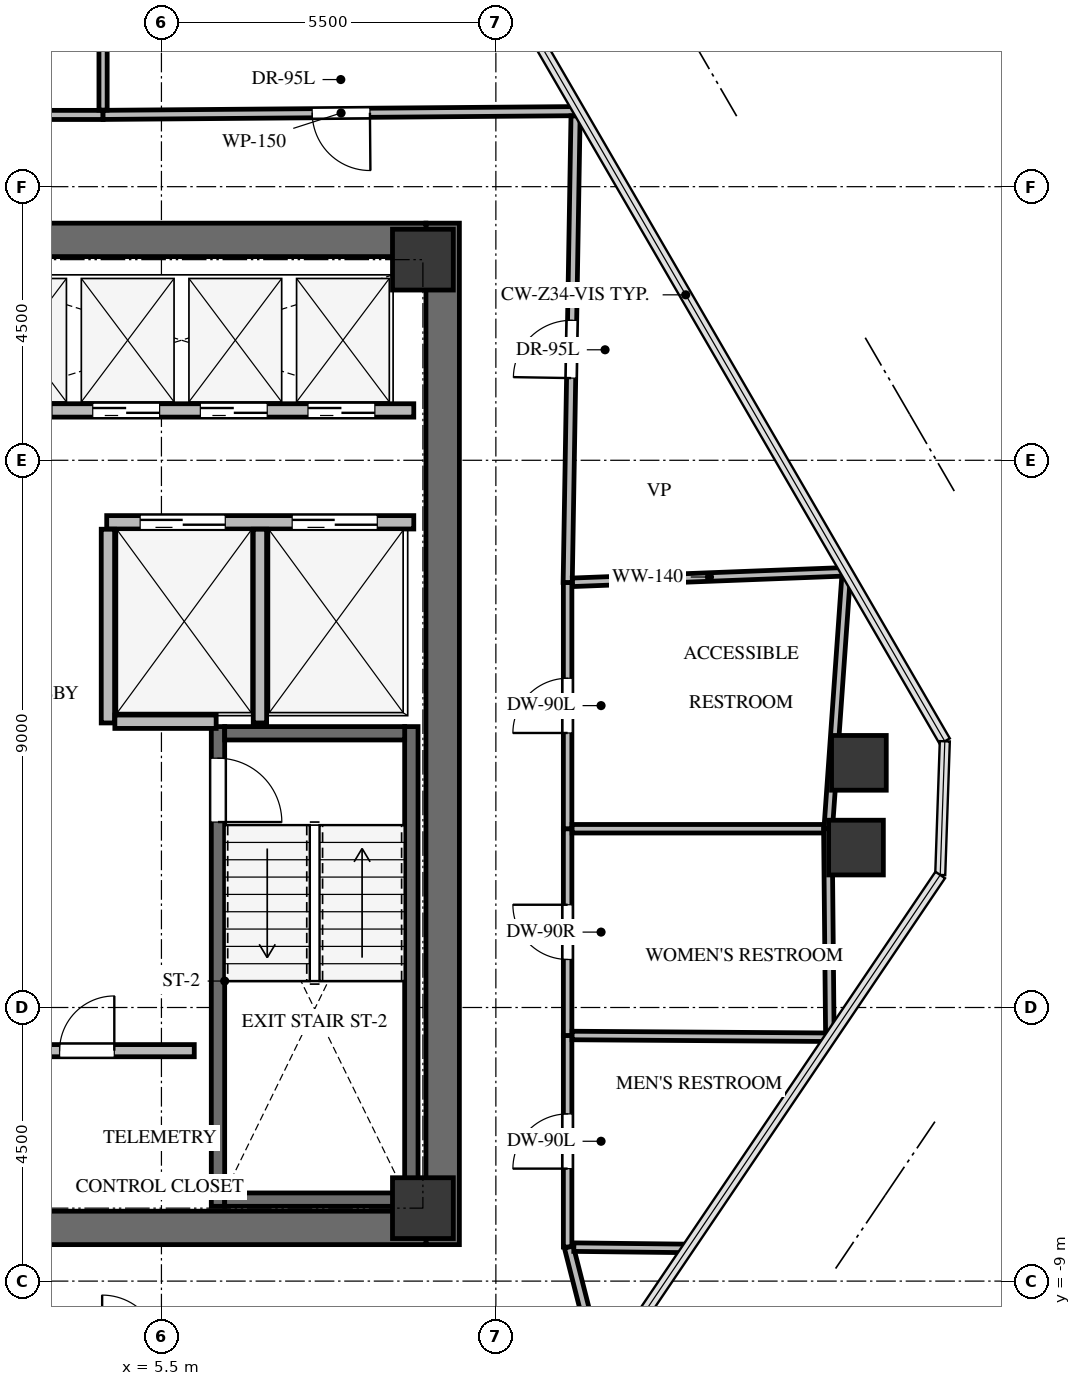
"""IFC4 building model, lengths in metres.
Left out: names, types, materials, properties, quantities, classifications, styles, units other than length and angle.
Written with IfcOpenShell. Run it as: python <this file> out.ifc"""

import sys

from ifc_helpers import new_model, si_unit, direction, frame, frame_2d, origin, origin_2d, place, context, subcontext, project, spatial, rectangle, extrude, source, transform, mapped, element, fill, save


model = new_model("IFC4")
c1 = context("Model", 3, precision=1e-05, world=origin(), true_north=direction((0.0, 1.0)))
c2 = subcontext(c1, "Body", "Model", "MODEL_VIEW")
j1 = project(units=[si_unit("LENGTHUNIT", "METRE"), si_unit("PLANEANGLEUNIT", "RADIAN")], contexts=[c1])
p1 = place(None, origin())
s1 = spatial("IfcSite", under=j1, at=p1, CompositionType="ELEMENT")
p2 = place(p1, origin())
s2 = spatial("IfcBuilding", under=s1, at=p2, CompositionType="ELEMENT")
p3 = place(p2, frame((0.0, 0.0, 231.5)))
s3 = spatial("IfcBuildingStorey", under=s2, at=p3, CompositionType="ELEMENT", Elevation=231.5)
p4 = place(p3, frame((10.125, -8.4, 0.0), z_axis=(0.0, 0.0, 1.0), x_axis=(0.0, 1.0, 0.0)))
e1 = element("IfcWall", 1, at=p4, inside=s3, PredefinedType="SHEAR", context=c2, shape_type="SweptSolid", body=[
    extrude(rectangle(XDim=16.8, YDim=0.55, at=frame_2d((8.4, 0.0))), origin(), (0.0, 0.0, 1.0), 3.3),
])
p5 = place(p3, frame((2.1, -8.125, 0.0), z_axis=(0.0, 0.0, 1.0), x_axis=(1.0, 0.0, 0.0)))
e2 = element("IfcWall", 2, at=p5, inside=s3, PredefinedType="SHEAR", context=c2, shape_type="SweptSolid", body=[
    extrude(rectangle(XDim=7.75, YDim=0.55, at=frame_2d((3.875, 0.0))), origin(), (0.0, 0.0, 1.0), 3.3),
])
p6 = place(p3, frame((-9.85, 8.125, 0.0), z_axis=(0.0, 0.0, 1.0), x_axis=(1.0, 0.0, 0.0)))
e3 = element("IfcWall", 3, at=p6, inside=s3, PredefinedType="SHEAR", context=c2, shape_type="SweptSolid", body=[
    extrude(rectangle(XDim=19.7, YDim=0.55, at=frame_2d((9.85, 0.0))), origin(), (0.0, 0.0, 1.0), 3.3),
])
p7 = place(p3, frame((9.61, -7.77, -0.24), z_axis=(0.0, 0.0, 1.0), x_axis=(0.0, 1.0, 0.0)))
e4 = element("IfcWall", 4, at=p7, inside=s3, PredefinedType="SHEAR", context=c2, shape_type="SweptSolid", body=[
    extrude(rectangle(XDim=7.89, YDim=0.22, at=frame_2d((3.945, 0.0))), origin(), (0.0, 0.0, 1.0), 3.3),
])
p8 = place(p3, frame((6.43, 0.12, -0.24), z_axis=(0.0, 0.0, 1.0), x_axis=(0.0, -1.0, 0.0)))
e5 = element("IfcWall", 5, at=p8, inside=s3, PredefinedType="SHEAR", context=c2, shape_type="SweptSolid", body=[
    extrude(rectangle(XDim=7.89, YDim=0.22, at=frame_2d((3.945, 0.0))), origin(), (0.0, 0.0, 1.0), 3.3),
])
p9 = place(p8, frame((0.52, 0.0, 0.0)))
e6 = element("IfcOpeningElement", 6, at=p9, cuts=e5, PredefinedType="OPENING", context=c2, shape_type="SweptSolid", body=[
    extrude(rectangle(XDim=1.05, YDim=2.15, at=frame_2d((0.525, 1.075))), frame((0.0, 0.12, 0.0), z_axis=(0.0, -1.0, 0.0), x_axis=(1.0, 0.0, 0.0)), (0.0, 0.0, 1.0), 0.24),
])
for number, where, z_axis, x_axis in (
    (7, (6.54, -7.66, -0.24), (0.0, 0.0, 1.0), (1.0, 0.0, 0.0)),
    (8, (9.5, 0.01, -0.24), (0.0, 0.0, 1.0), (-1.0, 0.0, 0.0)),
):
    element("IfcWall", number, at=place(p3, frame(where, z_axis=z_axis, x_axis=x_axis)), inside=s3, PredefinedType="SHEAR", context=c2, shape_type="SweptSolid", body=[
        extrude(rectangle(XDim=2.96, YDim=0.22, at=frame_2d((1.48, 0.0))), origin(), (0.0, 0.0, 1.0), 3.3),
    ])
m1 = source(origin(), c2, "Body", "SweptSolid", [
    extrude(rectangle(XDim=1.0, YDim=1.0, at=origin_2d()), origin(), (0.0, 0.0, 1.0), 3.3),
])
for number, where, z_axis, x_axis in (
    (9, (9.8, -7.8, -0.24), (0.0, 0.0, 1.0), (1.0, 0.0, 0.0)),
    (10, (9.8, 7.8, -0.24), (0.0, 0.0, 1.0), (1.0, 0.0, 0.0)),
):
    element("IfcColumn", number, at=place(p3, frame(where, z_axis=z_axis, x_axis=x_axis)), inside=s3, PredefinedType="COLUMN", context=c2, shape_type="MappedRepresentation", body=[
        mapped(m1, transform((0.0, 0.0, 0.0), x_axis=(1.0, 0.0, 0.0), y_axis=(0.0, 1.0, 0.0), z_axis=(0.0, 0.0, 1.0), scale=1.0)),
    ])
m2 = source(origin(), c2, "Body", "SweptSolid", [
    extrude(rectangle(XDim=0.9, YDim=0.9, at=origin_2d()), origin(), (0.0, 0.0, 1.0), 3.3),
])
for number, where, z_axis, x_axis in (
    (11, (16.97, -0.476, -0.24), (0.0, 0.0, 1.0), (1.0, 0.0, 0.0)),
    (12, (16.922, -1.87, -0.24), (0.0, 0.0, 1.0), (1.0, 0.0, 0.0)),
):
    element("IfcColumn", number, at=place(p3, frame(where, z_axis=z_axis, x_axis=x_axis)), inside=s3, PredefinedType="COLUMN", context=c2, shape_type="MappedRepresentation", body=[
        mapped(m2, transform((0.0, 0.0, 0.0), x_axis=(1.0, 0.0, 0.0), y_axis=(0.0, 1.0, 0.0), z_axis=(0.0, 0.0, 1.0), scale=1.0)),
    ])
p10 = place(p3, frame((4.6, 3.48, 0.0), z_axis=(0.0, 0.0, 1.0), x_axis=(1.0, 0.0, 0.0)))
e13 = element("IfcWall", 13, at=p10, inside=s3, PredefinedType="SOLIDWALL", context=c2, shape_type="SweptSolid", body=[
    extrude(rectangle(XDim=5.05, YDim=0.22, at=frame_2d((2.525, 0.0))), origin(), (0.0, 0.0, 1.0), 3.045),
])
p11 = place(p10, frame((0.55, 0.0, 0.0)))
e14 = element("IfcOpeningElement", 14, at=p11, cuts=e13, PredefinedType="OPENING", context=c2, shape_type="SweptSolid", body=[
    extrude(rectangle(XDim=1.4, YDim=2.15, at=frame_2d((0.7, 1.075))), frame((0.0, 0.12, 0.0), z_axis=(0.0, -1.0, 0.0), x_axis=(1.0, 0.0, 0.0)), (0.0, 0.0, 1.0), 0.24),
])
p12 = place(p10, frame((3.05, 0.0, 0.0)))
e15 = element("IfcOpeningElement", 15, at=p12, cuts=e13, PredefinedType="OPENING", context=c2, shape_type="SweptSolid", body=[
    extrude(rectangle(XDim=1.4, YDim=2.15, at=frame_2d((0.7, 1.075))), frame((0.0, 0.12, 0.0), z_axis=(0.0, -1.0, 0.0), x_axis=(1.0, 0.0, 0.0)), (0.0, 0.0, 1.0), 0.24),
])
for number, where, z_axis, x_axis in (
    (16, (4.62, 0.18, 0.0), (0.0, 0.0, 1.0), (0.0, 1.0, 0.0)),
    (17, (7.12, 0.18, 0.0), (0.0, 0.0, 1.0), (0.0, 1.0, 0.0)),
):
    element("IfcWall", number, at=place(p3, frame(where, z_axis=z_axis, x_axis=x_axis)), inside=s3, PredefinedType="SOLIDWALL", context=c2, shape_type="SweptSolid", body=[
        extrude(rectangle(XDim=3.186, YDim=0.22, at=frame_2d((1.593, 0.0))), origin(), (0.0, 0.0, 1.0), 3.045),
    ])
p13 = place(p3, frame((4.734, 0.2, 0.0), z_axis=(0.0, 0.0, 1.0), x_axis=(1.0, 0.0, 0.0)))
e18 = element("IfcWall", 18, at=p13, inside=s3, PredefinedType="SOLIDWALL", context=c2, shape_type="SweptSolid", body=[
    extrude(rectangle(XDim=1.666, YDim=0.22, at=frame_2d((0.833, 0.0))), origin(), (0.0, 0.0, 1.0), 3.045),
])
p14 = place(p3, frame((2.325, 5.32, 0.0), z_axis=(0.0, 0.0, 1.0), x_axis=(1.0, 0.0, 0.0)))
e19 = element("IfcWall", 19, at=p14, inside=s3, PredefinedType="SOLIDWALL", context=c2, shape_type="SweptSolid", body=[
    extrude(rectangle(XDim=7.325, YDim=0.22, at=frame_2d((3.663, 0.0))), origin(), (0.0, 0.0, 1.0), 3.045),
])
p15 = place(p14, frame((0.275, 0.0, 0.0)))
e20 = element("IfcOpeningElement", 20, at=p15, cuts=e19, PredefinedType="OPENING", context=c2, shape_type="SweptSolid", body=[
    extrude(rectangle(XDim=1.1, YDim=2.15, at=frame_2d((0.55, 1.075))), frame((0.0, 0.12, 0.0), z_axis=(0.0, -1.0, 0.0), x_axis=(1.0, 0.0, 0.0)), (0.0, 0.0, 1.0), 0.24),
])
p16 = place(p14, frame((2.045, 0.0, 0.0)))
e21 = element("IfcOpeningElement", 21, at=p16, cuts=e19, PredefinedType="OPENING", context=c2, shape_type="SweptSolid", body=[
    extrude(rectangle(XDim=1.1, YDim=2.15, at=frame_2d((0.55, 1.075))), frame((0.0, 0.12, 0.0), z_axis=(0.0, -1.0, 0.0), x_axis=(1.0, 0.0, 0.0)), (0.0, 0.0, 1.0), 0.24),
])
p17 = place(p14, frame((3.815, 0.0, 0.0)))
e22 = element("IfcOpeningElement", 22, at=p17, cuts=e19, PredefinedType="OPENING", context=c2, shape_type="SweptSolid", body=[
    extrude(rectangle(XDim=1.1, YDim=2.15, at=frame_2d((0.55, 1.075))), frame((0.0, 0.12, 0.0), z_axis=(0.0, -1.0, 0.0), x_axis=(1.0, 0.0, 0.0)), (0.0, 0.0, 1.0), 0.24),
])
p18 = place(p14, frame((5.585, 0.0, 0.0)))
e23 = element("IfcOpeningElement", 23, at=p18, cuts=e19, PredefinedType="OPENING", context=c2, shape_type="SweptSolid", body=[
    extrude(rectangle(XDim=1.1, YDim=2.15, at=frame_2d((0.55, 1.075))), frame((0.0, 0.12, 0.0), z_axis=(0.0, -1.0, 0.0), x_axis=(1.0, 0.0, 0.0)), (0.0, 0.0, 1.0), 0.24),
])
p19 = place(p3, frame((2.51, -5.21, 0.0), z_axis=(0.0, 0.0, 1.0), x_axis=(1.0, 0.0, 0.0)))
e24 = element("IfcWall", 24, at=p19, inside=s3, PredefinedType="SOLIDWALL", context=c2, shape_type="SweptSolid", body=[
    extrude(rectangle(XDim=3.53, YDim=0.2, at=frame_2d((1.765, 0.0))), origin(), (0.0, 0.0, 1.0), 3.045),
])
p20 = place(p19, frame((1.315, 0.0, 0.0)))
e25 = element("IfcOpeningElement", 25, at=p20, cuts=e24, PredefinedType="OPENING", context=c2, shape_type="SweptSolid", body=[
    extrude(rectangle(XDim=0.9, YDim=2.05, at=frame_2d((0.45, 1.025))), frame((0.0, 0.11, 0.0), z_axis=(0.0, -1.0, 0.0), x_axis=(1.0, 0.0, 0.0)), (0.0, 0.0, 1.0), 0.22),
])
p21 = place(p3, frame((12.18, -8.44, 0.0), z_axis=(0.0, 0.0, 1.0), x_axis=(0.0, 1.0, 0.0)))
e26 = element("IfcWall", 26, at=p21, inside=s3, PredefinedType="PARTITIONING", context=c2, shape_type="SweptSolid", body=[
    extrude(rectangle(XDim=3.48, YDim=0.14, at=frame_2d((1.74, 0.0))), origin(), (0.0, 0.0, 1.0), 2.399),
])
p22 = place(p21, frame((1.29, 0.0, 0.0)))
e27 = element("IfcOpeningElement", 27, at=p22, cuts=e26, PredefinedType="OPENING", context=c2, shape_type="SweptSolid", body=[
    extrude(rectangle(XDim=0.9, YDim=2.05, at=frame_2d((0.45, 1.025))), frame((0.0, 0.08, 0.0), z_axis=(0.0, -1.0, 0.0), x_axis=(1.0, 0.0, 0.0)), (0.0, 0.0, 1.0), 0.16),
])
p23 = place(p3, frame((12.18, -4.96, 0.0), z_axis=(0.0, 0.0, 1.0), x_axis=(0.0, 1.0, 0.0)))
e28 = element("IfcWall", 28, at=p23, inside=s3, PredefinedType="PARTITIONING", context=c2, shape_type="SweptSolid", body=[
    extrude(rectangle(XDim=3.4, YDim=0.14, at=frame_2d((1.7, 0.0))), origin(), (0.0, 0.0, 1.0), 3.045),
])
p24 = place(p23, frame((1.25, 0.0, 0.0)))
e29 = element("IfcOpeningElement", 29, at=p24, cuts=e28, PredefinedType="OPENING", context=c2, shape_type="SweptSolid", body=[
    extrude(rectangle(XDim=0.9, YDim=2.05, at=frame_2d((0.45, 1.025))), frame((0.0, 0.08, 0.0), z_axis=(0.0, -1.0, 0.0), x_axis=(1.0, 0.0, 0.0)), (0.0, 0.0, 1.0), 0.16),
])
p25 = place(p3, frame((12.18, -1.56, 0.0), z_axis=(0.0, 0.0, 1.0), x_axis=(0.0, 1.0, 0.0)))
e30 = element("IfcWall", 30, at=p25, inside=s3, PredefinedType="PARTITIONING", context=c2, shape_type="SweptSolid", body=[
    extrude(rectangle(XDim=4.05, YDim=0.14, at=frame_2d((2.025, 0.0))), origin(), (0.0, 0.0, 1.0), 2.301),
])
p26 = place(p25, frame((1.575, 0.0, 0.0)))
e31 = element("IfcOpeningElement", 31, at=p26, cuts=e30, PredefinedType="OPENING", context=c2, shape_type="SweptSolid", body=[
    extrude(rectangle(XDim=0.9, YDim=2.05, at=frame_2d((0.45, 1.025))), frame((0.0, 0.08, 0.0), z_axis=(0.0, -1.0, 0.0), x_axis=(1.0, 0.0, 0.0)), (0.0, 0.0, 1.0), 0.16),
])
p27 = place(p3, frame((4.54, 10.18, 0.0), z_axis=(0.0, 0.0, 1.0), x_axis=(-1.0, 0.0, 0.0)))
e32 = element("IfcWall", 32, at=p27, inside=s3, PredefinedType="PARTITIONING", context=c2, shape_type="SweptSolid", body=[
    extrude(rectangle(XDim=3.451, YDim=0.15, at=frame_2d((1.726, 0.0))), origin(), (0.0, 0.0, 1.0), 3.045),
])
p28 = place(p3, frame((12.368, 10.243, 0.0), z_axis=(0.0, 0.0, 1.0), x_axis=(-0.999968379606, -0.007952344825, 0.0)))
e33 = element("IfcWall", 33, at=p28, inside=s3, PredefinedType="PARTITIONING", context=c2, shape_type="SweptSolid", body=[
    extrude(rectangle(XDim=7.829, YDim=0.15, at=frame_2d((3.914, 0.0))), origin(), (0.0, 0.0, 1.0), 2.301),
])
p29 = place(p28, frame((3.439, 0.0, 0.0)))
e34 = element("IfcOpeningElement", 34, at=p29, cuts=e33, PredefinedType="OPENING", context=c2, shape_type="SweptSolid", body=[
    extrude(rectangle(XDim=0.95, YDim=2.1, at=frame_2d((0.475, 1.05))), frame((0.0, 0.085, 0.0), z_axis=(0.0, -1.0, 0.0), x_axis=(1.0, 0.0, 0.0)), (0.0, 0.0, 1.0), 0.17),
])
p30 = place(p3, frame((12.718, -10.477, 0.0), z_axis=(0.0, 0.0, 1.0), x_axis=(-0.246496791887, 0.96914360731, 0.0)))
e35 = element("IfcWall", 35, at=p30, inside=s3, PredefinedType="PARTITIONING", context=c2, shape_type="SweptSolid", body=[
    extrude(rectangle(XDim=2.102, YDim=0.15, at=frame_2d((1.051, 0.0))), origin(), (0.0, 0.0, 1.0), 2.399),
])
p31 = place(p3, frame((12.181, 2.49, 0.0), z_axis=(0.0, 0.0, 1.0), x_axis=(0.016828669653, 0.999858387912, 0.0)))
e36 = element("IfcWall", 36, at=p31, inside=s3, PredefinedType="PARTITIONING", context=c2, shape_type="SweptSolid", body=[
    extrude(rectangle(XDim=7.674, YDim=0.15, at=frame_2d((3.837, 0.0))), origin(), (0.0, 0.0, 1.0), 2.399),
])
p32 = place(p31, frame((3.362, 0.0, 0.0)))
e37 = element("IfcOpeningElement", 37, at=p32, cuts=e36, PredefinedType="OPENING", context=c2, shape_type="SweptSolid", body=[
    extrude(rectangle(XDim=0.95, YDim=2.1, at=frame_2d((0.475, 1.05))), frame((0.0, 0.085, 0.0), z_axis=(0.0, -1.0, 0.0), x_axis=(1.0, 0.0, 0.0)), (0.0, 0.0, 1.0), 0.17),
])
p33 = place(p3, frame((12.254, -4.96, 0.0), z_axis=(0.0, 0.0, 1.0), x_axis=(0.999976630429, -0.006836563198, 0.0)))
e38 = element("IfcWall", 38, at=p33, inside=s3, PredefinedType="PARTITIONING", context=c2, shape_type="SweptSolid", body=[
    extrude(rectangle(XDim=4.25, YDim=0.14, at=frame_2d((2.125, 0.0))), origin(), (0.0, 0.0, 1.0), 2.399),
])
p34 = place(p3, frame((14.156, -8.462, 0.0), z_axis=(0.0, 0.0, 1.0), x_axis=(-0.999935742613, 0.011336253532, 0.0)))
e39 = element("IfcWall", 39, at=p34, inside=s3, PredefinedType="PARTITIONING", context=c2, shape_type="SweptSolid", body=[
    extrude(rectangle(XDim=1.874, YDim=0.14, at=frame_2d((0.937, 0.0))), origin(), (0.0, 0.0, 1.0), 2.399),
])
p35 = place(p3, frame((12.254, -1.56, 0.0), z_axis=(0.0, 0.0, 1.0), x_axis=(1.0, 0.0, 0.0)))
e40 = element("IfcWall", 40, at=p35, inside=s3, PredefinedType="PARTITIONING", context=c2, shape_type="SweptSolid", body=[
    extrude(rectangle(XDim=4.206, YDim=0.14, at=frame_2d((2.103, 0.0))), origin(), (0.0, 0.0, 1.0), 2.301),
])
p36 = place(p3, frame((16.46, -1.56, 0.0), z_axis=(0.0, 0.0, 1.0), x_axis=(0.009604446748, -0.999953876238, 0.0)))
e41 = element("IfcWall", 41, at=p36, inside=s3, PredefinedType="PARTITIONING", context=c2, shape_type="SweptSolid", body=[
    extrude(rectangle(XDim=3.355, YDim=0.14, at=frame_2d((1.678, 0.0))), origin(), (0.0, 0.0, 1.0), 2.301),
])
p37 = place(p3, frame((12.26, 2.493, 0.0), z_axis=(0.0, 0.0, 1.0), x_axis=(0.999256206289, 0.038562082324, 0.0)))
e42 = element("IfcWall", 42, at=p37, inside=s3, PredefinedType="PARTITIONING", context=c2, shape_type="SweptSolid", body=[
    extrude(rectangle(XDim=4.508, YDim=0.14, at=frame_2d((2.254, 0.0))), origin(), (0.0, 0.0, 1.0), 2.399),
])
p38 = place(p3, frame((16.76, 2.593, 0.0), z_axis=(0.0, 0.0, 1.0), x_axis=(-0.07055102187, -0.997508172053, 0.0)))
e43 = element("IfcWall", 43, at=p38, inside=s3, PredefinedType="PARTITIONING", context=c2, shape_type="SweptSolid", body=[
    extrude(rectangle(XDim=4.163, YDim=0.14, at=frame_2d((2.082, 0.0))), origin(), (0.0, 0.0, 1.0), 2.301),
])
p39 = place(p3, frame((4.54, 15.662, 0.0), z_axis=(0.0, 0.0, 1.0), x_axis=(0.0, -1.0, 0.0)))
e44 = element("IfcWall", 44, at=p39, inside=s3, PredefinedType="PARTITIONING", context=c2, shape_type="SweptSolid", body=[
    extrude(rectangle(XDim=5.403, YDim=0.135, at=frame_2d((2.701, 0.0))), origin(), (0.0, 0.0, 1.0), 2.399),
])
m3 = source(origin(), c2, "Body", "SweptSolid", [
    extrude(rectangle(XDim=1.05, YDim=2.15, at=frame_2d((0.525, 1.075))), frame((0.0, 0.025, 0.0), z_axis=(0.0, -1.0, 0.0), x_axis=(1.0, 0.0, 0.0)), (0.0, 0.0, 1.0), 0.05),
])
p40 = place(p9, origin())
e45 = element("IfcDoor", 45, at=p40, inside=s3, OperationType="SINGLE_SWING_RIGHT", PredefinedType="DOOR", context=c2, shape_type="MappedRepresentation", body=[
    mapped(m3, transform((0.0, 0.0, 0.0), x_axis=(1.0, 0.0, 0.0), y_axis=(0.0, 1.0, 0.0), z_axis=(0.0, 0.0, 1.0), scale=1.0)),
])
fill(e6, e45)
m4 = source(origin(), c2, "Body", "SweptSolid", [
    extrude(rectangle(XDim=1.4, YDim=2.15, at=frame_2d((0.7, 1.075))), frame((0.0, 0.025, 0.0), z_axis=(0.0, -1.0, 0.0), x_axis=(1.0, 0.0, 0.0)), (0.0, 0.0, 1.0), 0.05),
])
p41 = place(p11, origin())
e46 = element("IfcDoor", 46, at=p41, inside=s3, OperationType="DOUBLE_DOOR_SLIDING", PredefinedType="DOOR", context=c2, shape_type="MappedRepresentation", body=[
    mapped(m4, transform((0.0, 0.0, 0.0), x_axis=(1.0, 0.0, 0.0), y_axis=(0.0, 1.0, 0.0), z_axis=(0.0, 0.0, 1.0), scale=1.0)),
])
fill(e14, e46)
p42 = place(p12, origin())
e47 = element("IfcDoor", 47, at=p42, inside=s3, OperationType="DOUBLE_DOOR_SLIDING", PredefinedType="DOOR", context=c2, shape_type="MappedRepresentation", body=[
    mapped(m4, transform((0.0, 0.0, 0.0), x_axis=(1.0, 0.0, 0.0), y_axis=(0.0, 1.0, 0.0), z_axis=(0.0, 0.0, 1.0), scale=1.0)),
])
fill(e15, e47)
m5 = source(origin(), c2, "Body", "SweptSolid", [
    extrude(rectangle(XDim=1.1, YDim=2.15, at=frame_2d((0.55, 1.075))), frame((0.0, 0.025, 0.0), z_axis=(0.0, -1.0, 0.0), x_axis=(1.0, 0.0, 0.0)), (0.0, 0.0, 1.0), 0.05),
])
p43 = place(p16, origin())
e48 = element("IfcDoor", 48, at=p43, inside=s3, OperationType="DOUBLE_DOOR_SLIDING", PredefinedType="DOOR", context=c2, shape_type="MappedRepresentation", body=[
    mapped(m5, transform((0.0, 0.0, 0.0), x_axis=(1.0, 0.0, 0.0), y_axis=(0.0, 1.0, 0.0), z_axis=(0.0, 0.0, 1.0), scale=1.0)),
])
fill(e21, e48)
p44 = place(p17, origin())
e49 = element("IfcDoor", 49, at=p44, inside=s3, OperationType="DOUBLE_DOOR_SLIDING", PredefinedType="DOOR", context=c2, shape_type="MappedRepresentation", body=[
    mapped(m5, transform((0.0, 0.0, 0.0), x_axis=(1.0, 0.0, 0.0), y_axis=(0.0, 1.0, 0.0), z_axis=(0.0, 0.0, 1.0), scale=1.0)),
])
fill(e22, e49)
p45 = place(p18, origin())
e50 = element("IfcDoor", 50, at=p45, inside=s3, OperationType="DOUBLE_DOOR_SLIDING", PredefinedType="DOOR", context=c2, shape_type="MappedRepresentation", body=[
    mapped(m5, transform((0.0, 0.0, 0.0), x_axis=(1.0, 0.0, 0.0), y_axis=(0.0, 1.0, 0.0), z_axis=(0.0, 0.0, 1.0), scale=1.0)),
])
fill(e23, e50)
m6 = source(origin(), c2, "Body", "SweptSolid", [
    extrude(rectangle(XDim=0.9, YDim=2.05, at=frame_2d((0.45, 1.025))), frame((0.0, 0.025, 0.0), z_axis=(0.0, -1.0, 0.0), x_axis=(1.0, 0.0, 0.0)), (0.0, 0.0, 1.0), 0.05),
])
p46 = place(p20, origin())
e51 = element("IfcDoor", 51, at=p46, inside=s3, OperationType="SINGLE_SWING_RIGHT", PredefinedType="DOOR", context=c2, shape_type="MappedRepresentation", body=[
    mapped(m6, transform((0.0, 0.0, 0.0), x_axis=(1.0, 0.0, 0.0), y_axis=(0.0, 1.0, 0.0), z_axis=(0.0, 0.0, 1.0), scale=1.0)),
])
fill(e25, e51)
m7 = source(origin(), c2, "Body", "SweptSolid", [
    extrude(rectangle(XDim=0.9, YDim=2.05, at=frame_2d((0.45, 1.025))), frame((0.0, 0.025, 0.0), z_axis=(0.0, -1.0, 0.0), x_axis=(1.0, 0.0, 0.0)), (0.0, 0.0, 1.0), 0.05),
])
p47 = place(p22, origin())
e52 = element("IfcDoor", 52, at=p47, inside=s3, OperationType="SINGLE_SWING_LEFT", PredefinedType="DOOR", context=c2, shape_type="MappedRepresentation", body=[
    mapped(m7, transform((0.0, 0.0, 0.0), x_axis=(1.0, 0.0, 0.0), y_axis=(0.0, 1.0, 0.0), z_axis=(0.0, 0.0, 1.0), scale=1.0)),
])
fill(e27, e52)
m8 = source(origin(), c2, "Body", "SweptSolid", [
    extrude(rectangle(XDim=0.9, YDim=2.05, at=frame_2d((0.45, 1.025))), frame((0.0, 0.025, 0.0), z_axis=(0.0, -1.0, 0.0), x_axis=(1.0, 0.0, 0.0)), (0.0, 0.0, 1.0), 0.05),
])
p48 = place(p24, origin())
e53 = element("IfcDoor", 53, at=p48, inside=s3, OperationType="SINGLE_SWING_RIGHT", PredefinedType="DOOR", context=c2, shape_type="MappedRepresentation", body=[
    mapped(m8, transform((0.0, 0.0, 0.0), x_axis=(1.0, 0.0, 0.0), y_axis=(0.0, 1.0, 0.0), z_axis=(0.0, 0.0, 1.0), scale=1.0)),
])
fill(e29, e53)
p49 = place(p26, origin())
e54 = element("IfcDoor", 54, at=p49, inside=s3, OperationType="SINGLE_SWING_LEFT", PredefinedType="DOOR", context=c2, shape_type="MappedRepresentation", body=[
    mapped(m7, transform((0.0, 0.0, 0.0), x_axis=(1.0, 0.0, 0.0), y_axis=(0.0, 1.0, 0.0), z_axis=(0.0, 0.0, 1.0), scale=1.0)),
])
fill(e31, e54)
m9 = source(origin(), c2, "Body", "SweptSolid", [
    extrude(rectangle(XDim=0.95, YDim=2.1, at=frame_2d((0.475, 1.05))), frame((0.0, 0.025, 0.0), z_axis=(0.0, -1.0, 0.0), x_axis=(1.0, 0.0, 0.0)), (0.0, 0.0, 1.0), 0.05),
])
p50 = place(p29, origin())
e55 = element("IfcDoor", 55, at=p50, inside=s3, OperationType="SINGLE_SWING_LEFT", PredefinedType="DOOR", context=c2, shape_type="MappedRepresentation", body=[
    mapped(m9, transform((0.0, 0.0, 0.0), x_axis=(1.0, 0.0, 0.0), y_axis=(0.0, 1.0, 0.0), z_axis=(0.0, 0.0, 1.0), scale=1.0)),
])
fill(e34, e55)
p51 = place(p32, origin())
e56 = element("IfcDoor", 56, at=p51, inside=s3, OperationType="SINGLE_SWING_LEFT", PredefinedType="DOOR", context=c2, shape_type="MappedRepresentation", body=[
    mapped(m9, transform((0.0, 0.0, 0.0), x_axis=(1.0, 0.0, 0.0), y_axis=(0.0, 1.0, 0.0), z_axis=(0.0, 0.0, 1.0), scale=1.0)),
])
fill(e37, e56)
save(model, sys.argv[1])
